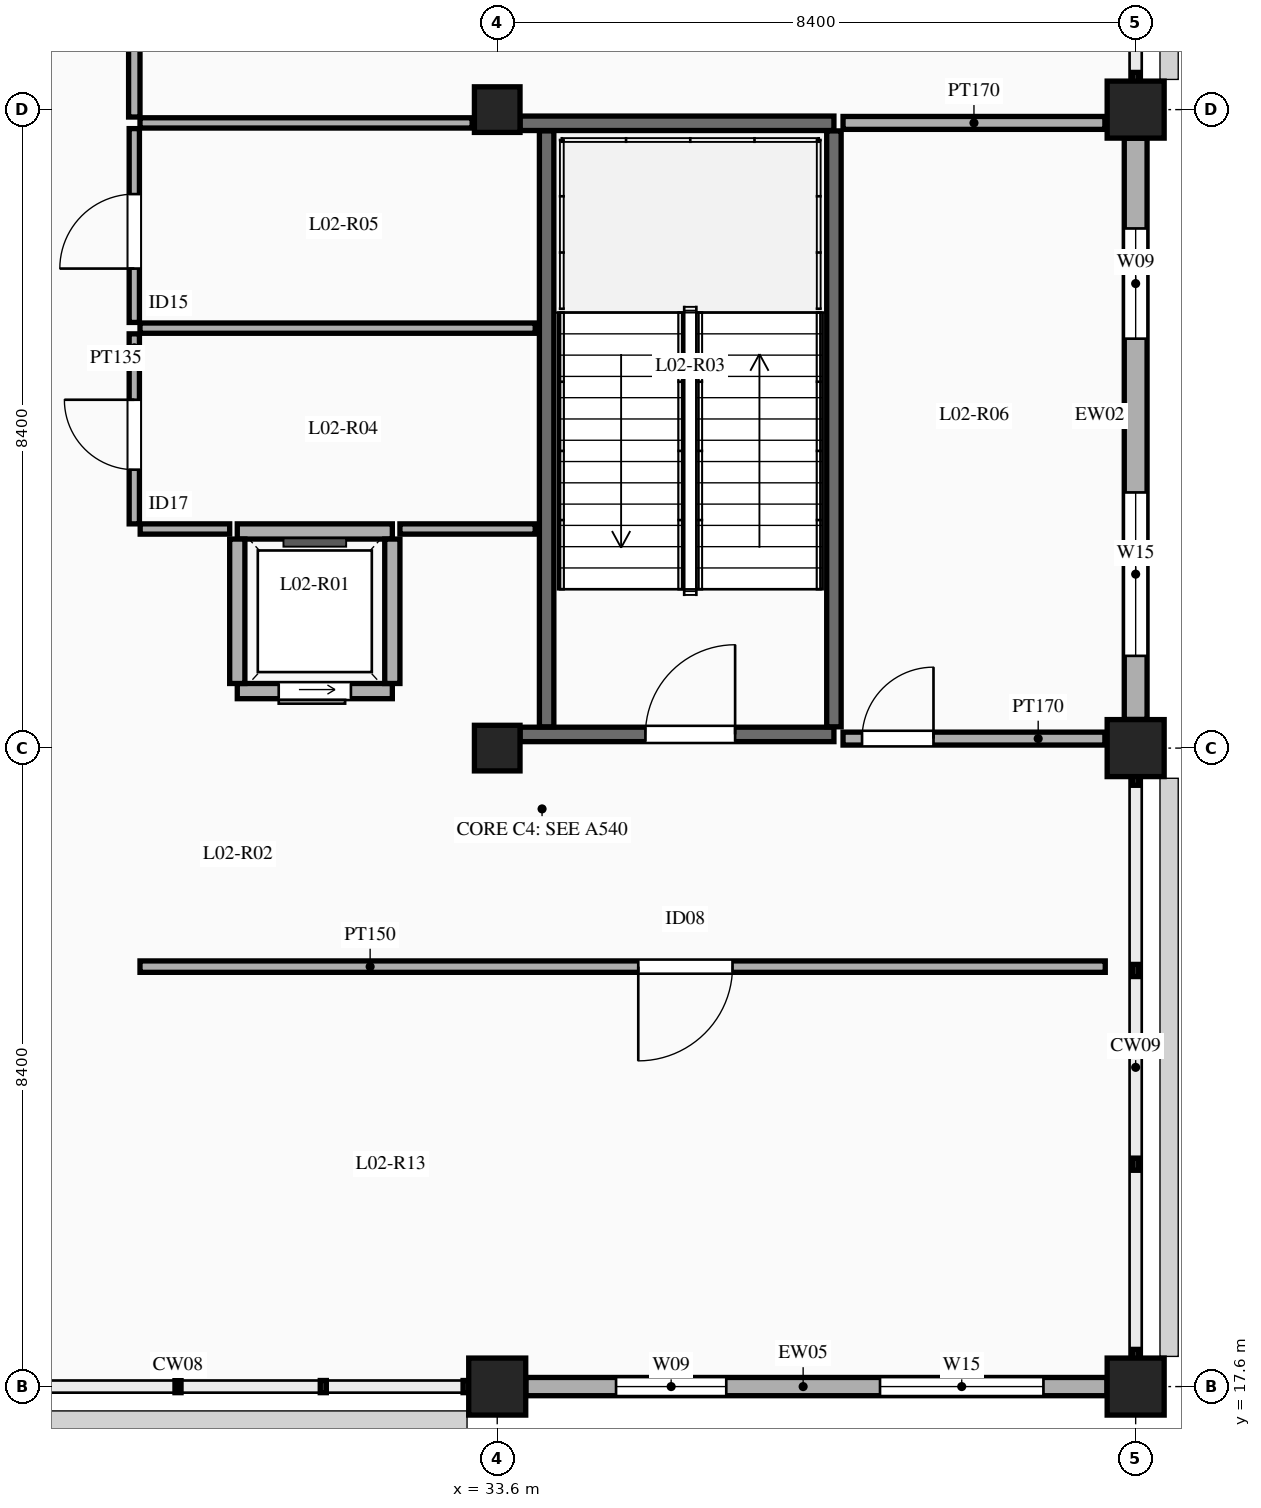
"""IFC4 building model, lengths in metres.
Left out: names, types, materials, properties, quantities, classifications, styles, units other than length and angle.
Written with IfcOpenShell. Run it as: python <this file> out.ifc"""

import sys

from ifc_helpers import new_model, si_unit, direction, frame, frame_2d, origin, origin_2d, place, context, subcontext, project, spatial, rectangle, circle, extrude, element, fill, save


model = new_model("IFC4")
c1 = context("Model", 3, precision=1e-05, world=origin(), true_north=direction((0.0, 1.0)))
c2 = subcontext(c1, "Body", "Model", "MODEL_VIEW")
j1 = project(units=[si_unit("LENGTHUNIT", "METRE"), si_unit("PLANEANGLEUNIT", "RADIAN")], contexts=[c1])
p1 = place(None, origin())
s1 = spatial("IfcSite", under=j1, at=p1, CompositionType="ELEMENT")
p2 = place(p1, origin())
s2 = spatial("IfcBuilding", under=s1, at=p2, CompositionType="ELEMENT")
p3 = place(p2, frame((0.0, 0.0, 10.2)))
s3 = spatial("IfcBuildingStorey", under=s2, at=p3, CompositionType="ELEMENT", Elevation=10.2)
p4 = place(p3, frame((33.6, 17.6, 0.0), z_axis=(0.0, 0.0, 1.0), x_axis=(1.0, 0.0, 0.0)))
e1 = element("IfcColumn", 1, at=p4, inside=s3, PredefinedType="COLUMN", context=c2, shape_type="SweptSolid", body=[
    extrude(circle(Radius=0.375, at=origin_2d()), origin(), (0.0, 0.0, 1.0), 4.8),
])
for number, where, z_axis, x_axis in (
    (2, (33.6, 26.0, 0.0), (0.0, 0.0, 1.0), (1.0, 0.0, 0.0)),
    (3, (33.6, 34.4, 0.0), (0.0, 0.0, 1.0), (1.0, 0.0, 0.0)),
):
    element("IfcColumn", number, at=place(p3, frame(where, z_axis=z_axis, x_axis=x_axis)), inside=s3, PredefinedType="COLUMN", context=c2, shape_type="SweptSolid", body=[
        extrude(rectangle(XDim=0.6, YDim=0.6, at=origin_2d()), origin(), (0.0, 0.0, 1.0), 4.8),
    ])
for number, where, z_axis, x_axis in (
    (4, (42.0, 17.6, 0.0), (0.0, 0.0, 1.0), (1.0, 0.0, 0.0)),
    (5, (42.0, 26.0, 0.0), (0.0, 0.0, 1.0), (1.0, 0.0, 0.0)),
    (6, (42.0, 34.4, 0.0), (0.0, 0.0, 1.0), (1.0, 0.0, 0.0)),
):
    element("IfcColumn", number, at=place(p3, frame(where, z_axis=z_axis, x_axis=x_axis)), inside=s3, PredefinedType="COLUMN", context=c2, shape_type="SweptSolid", body=[
        extrude(circle(Radius=0.375, at=origin_2d()), origin(), (0.0, 0.0, 1.0), 4.8),
    ])
p5 = place(p3, frame((33.977, 17.6, 0.0), z_axis=(0.0, 0.0, 1.0), x_axis=(1.0, 0.0, 0.0)))
e7 = element("IfcWall", 7, at=p5, inside=s3, PredefinedType="SOLIDWALL", context=c2, shape_type="SweptSolid", body=[
    extrude(rectangle(XDim=7.646, YDim=0.24, at=frame_2d((3.823, 0.0))), origin(), (0.0, 0.0, 1.0), 3.85),
])
p6 = place(p5, frame((1.187, 0.0, 0.9)))
e8 = element("IfcOpeningElement", 8, at=p6, cuts=e7, PredefinedType="OPENING", context=c2, shape_type="SweptSolid", body=[
    extrude(rectangle(XDim=1.45, YDim=1.8, at=frame_2d((0.725, 0.9))), frame((0.0, 0.13, 0.0), z_axis=(0.0, -1.0, 0.0), x_axis=(1.0, 0.0, 0.0)), (0.0, 0.0, 1.0), 0.26),
])
p7 = place(p5, frame((4.659, 0.0, 1.1)))
e9 = element("IfcOpeningElement", 9, at=p7, cuts=e7, PredefinedType="OPENING", context=c2, shape_type="SweptSolid", body=[
    extrude(rectangle(XDim=2.15, YDim=2.15, at=frame_2d((1.075, 1.075))), frame((0.0, 0.13, 0.0), z_axis=(0.0, -1.0, 0.0), x_axis=(1.0, 0.0, 0.0)), (0.0, 0.0, 1.0), 0.26),
])
p8 = place(p3, frame((42.0, 26.377, 0.0), z_axis=(0.0, 0.0, 1.0), x_axis=(0.0, 1.0, 0.0)))
e10 = element("IfcWall", 10, at=p8, inside=s3, PredefinedType="SOLIDWALL", context=c2, shape_type="SweptSolid", body=[
    extrude(rectangle(XDim=7.646, YDim=0.3, at=frame_2d((3.823, 0.0))), origin(), (0.0, 0.0, 1.0), 3.85),
])
p9 = place(p8, frame((0.836, 0.0, 1.1)))
e11 = element("IfcOpeningElement", 11, at=p9, cuts=e10, PredefinedType="OPENING", context=c2, shape_type="SweptSolid", body=[
    extrude(rectangle(XDim=2.15, YDim=2.15, at=frame_2d((1.075, 1.075))), frame((0.0, 0.16, 0.0), z_axis=(0.0, -1.0, 0.0), x_axis=(1.0, 0.0, 0.0)), (0.0, 0.0, 1.0), 0.32),
])
p10 = place(p8, frame((5.01, 0.0, 0.9)))
e12 = element("IfcOpeningElement", 12, at=p10, cuts=e10, PredefinedType="OPENING", context=c2, shape_type="SweptSolid", body=[
    extrude(rectangle(XDim=1.45, YDim=1.8, at=frame_2d((0.725, 0.9))), frame((0.0, 0.16, 0.0), z_axis=(0.0, -1.0, 0.0), x_axis=(1.0, 0.0, 0.0)), (0.0, 0.0, 1.0), 0.32),
])
p11 = place(p3, frame((30.18, 26.75, 0.0), z_axis=(0.0, 0.0, 1.0), x_axis=(1.0, 0.0, 0.0)))
e13 = element("IfcWall", 13, at=p11, inside=s3, PredefinedType="SOLIDWALL", context=c2, shape_type="SweptSolid", body=[
    extrude(rectangle(XDim=2.04, YDim=0.2, at=frame_2d((1.02, 0.0))), origin(), (0.0, 0.0, 1.0), 4.55),
])
p12 = place(p11, frame((0.545, 0.0, 0.0)))
e14 = element("IfcOpeningElement", 14, at=p12, cuts=e13, PredefinedType="OPENING", context=c2, shape_type="SweptSolid", body=[
    extrude(rectangle(XDim=0.95, YDim=2.15, at=frame_2d((0.475, 1.075))), frame((0.0, 0.11, 0.0), z_axis=(0.0, -1.0, 0.0), x_axis=(1.0, 0.0, 0.0)), (0.0, 0.0, 1.0), 0.22),
])
p13 = place(p3, frame((30.18, 28.85, 0.0), z_axis=(0.0, 0.0, 1.0), x_axis=(1.0, 0.0, 0.0)))
e15 = element("IfcWall", 15, at=p13, inside=s3, PredefinedType="SOLIDWALL", context=c2, shape_type="SweptSolid", body=[
    extrude(rectangle(XDim=2.04, YDim=0.2, at=frame_2d((1.02, 0.0))), origin(), (0.0, 0.0, 1.0), 4.55),
])
for number, where, z_axis, x_axis in (
    (16, (30.18, 26.85, 0.0), (0.0, 0.0, 1.0), (0.0, 1.0, 0.0)),
    (17, (32.22, 26.85, 0.0), (0.0, 0.0, 1.0), (0.0, 1.0, 0.0)),
):
    element("IfcWall", number, at=place(p3, frame(where, z_axis=z_axis, x_axis=x_axis)), inside=s3, PredefinedType="SOLIDWALL", context=c2, shape_type="SweptSolid", body=[
        extrude(rectangle(XDim=1.9, YDim=0.2, at=frame_2d((0.95, 0.0))), origin(), (0.0, 0.0, 1.0), 4.55),
    ])
p14 = place(p3, frame((33.9, 26.18, 0.0), z_axis=(0.0, 0.0, 1.0), x_axis=(1.0, 0.0, 0.0)))
e18 = element("IfcWall", 18, at=p14, inside=s3, PredefinedType="SOLIDWALL", context=c2, shape_type="SweptSolid", body=[
    extrude(rectangle(XDim=4.13, YDim=0.19, at=frame_2d((2.065, 0.0))), origin(), (0.0, 0.0, 1.0), 4.55),
])
p15 = place(p14, frame((1.65, 0.0, 0.0)))
e19 = element("IfcOpeningElement", 19, at=p15, cuts=e18, PredefinedType="OPENING", context=c2, shape_type="SweptSolid", body=[
    extrude(rectangle(XDim=1.18, YDim=2.15, at=frame_2d((0.59, 1.075))), frame((0.0, 0.105, 0.0), z_axis=(0.0, -1.0, 0.0), x_axis=(1.0, 0.0, 0.0)), (0.0, 0.0, 1.0), 0.21),
])
p16 = place(p3, frame((33.9, 34.22, 0.0), z_axis=(0.0, 0.0, 1.0), x_axis=(1.0, 0.0, 0.0)))
e20 = element("IfcWall", 20, at=p16, inside=s3, PredefinedType="SOLIDWALL", context=c2, shape_type="SweptSolid", body=[
    extrude(rectangle(XDim=4.13, YDim=0.19, at=frame_2d((2.065, 0.0))), origin(), (0.0, 0.0, 1.0), 4.55),
])
for number, where, z_axis, x_axis in (
    (21, (34.25, 26.28, 0.0), (0.0, 0.0, 1.0), (0.0, 1.0, 0.0)),
    (22, (38.03, 26.28, 0.0), (0.0, 0.0, 1.0), (0.0, 1.0, 0.0)),
):
    element("IfcWall", number, at=place(p3, frame(where, z_axis=z_axis, x_axis=x_axis)), inside=s3, PredefinedType="SOLIDWALL", context=c2, shape_type="SweptSolid", body=[
        extrude(rectangle(XDim=7.84, YDim=0.19, at=frame_2d((3.92, 0.0))), origin(), (0.0, 0.0, 1.0), 4.55),
    ])
p17 = place(p3, frame((38.15, 26.125, 0.0), z_axis=(0.0, 0.0, 1.0), x_axis=(1.0, 0.0, 0.0)))
e23 = element("IfcWall", 23, at=p17, inside=s3, PredefinedType="PARTITIONING", context=c2, shape_type="SweptSolid", body=[
    extrude(rectangle(XDim=3.445, YDim=0.17, at=frame_2d((1.723, 0.0))), origin(), (0.0, 0.0, 1.0), 3.75),
])
p18 = place(p17, frame((0.25, 0.0, 0.0)))
e24 = element("IfcOpeningElement", 24, at=p18, cuts=e23, PredefinedType="OPENING", context=c2, shape_type="SweptSolid", body=[
    extrude(rectangle(XDim=0.94, YDim=2.1, at=frame_2d((0.47, 1.05))), frame((0.0, 0.095, 0.0), z_axis=(0.0, -1.0, 0.0), x_axis=(1.0, 0.0, 0.0)), (0.0, 0.0, 1.0), 0.19),
])
p19 = place(p3, frame((28.9, 23.125, 0.0), z_axis=(0.0, 0.0, 1.0), x_axis=(1.0, 0.0, 0.0)))
e25 = element("IfcWall", 25, at=p19, inside=s3, PredefinedType="PARTITIONING", context=c2, shape_type="SweptSolid", body=[
    extrude(rectangle(XDim=12.7, YDim=0.15, at=frame_2d((6.35, 0.0))), origin(), (0.0, 0.0, 1.0), 3.75),
])
p20 = place(p19, frame((6.556, 0.0, 0.0)))
e26 = element("IfcOpeningElement", 26, at=p20, cuts=e25, PredefinedType="OPENING", context=c2, shape_type="SweptSolid", body=[
    extrude(rectangle(XDim=1.24, YDim=2.2, at=frame_2d((0.62, 1.1))), frame((0.0, 0.085, 0.0), z_axis=(0.0, -1.0, 0.0), x_axis=(1.0, 0.0, 0.0)), (0.0, 0.0, 1.0), 0.17),
])
p21 = place(p3, frame((28.9, 31.525, 0.0), z_axis=(0.0, 0.0, 1.0), x_axis=(1.0, 0.0, 0.0)))
e27 = element("IfcWall", 27, at=p21, inside=s3, PredefinedType="PARTITIONING", context=c2, shape_type="SweptSolid", body=[
    extrude(rectangle(XDim=5.2, YDim=0.135, at=frame_2d((2.6, 0.0))), origin(), (0.0, 0.0, 1.0), 3.75),
])
p22 = place(p3, frame((28.825, 28.95, 0.0), z_axis=(0.0, 0.0, 1.0), x_axis=(0.0, 1.0, 0.0)))
e28 = element("IfcWall", 28, at=p22, inside=s3, PredefinedType="PARTITIONING", context=c2, shape_type="SweptSolid", body=[
    extrude(rectangle(XDim=2.5, YDim=0.135, at=frame_2d((1.25, 0.0))), origin(), (0.0, 0.0, 1.0), 3.75),
])
p23 = place(p22, frame((0.713, 0.0, 0.0)))
e29 = element("IfcOpeningElement", 29, at=p23, cuts=e28, PredefinedType="OPENING", context=c2, shape_type="SweptSolid", body=[
    extrude(rectangle(XDim=0.92, YDim=2.12, at=frame_2d((0.46, 1.06))), frame((0.0, 0.077, 0.0), z_axis=(0.0, -1.0, 0.0), x_axis=(1.0, 0.0, 0.0)), (0.0, 0.0, 1.0), 0.155),
])
p24 = place(p3, frame((28.825, 31.6, 0.0), z_axis=(0.0, 0.0, 1.0), x_axis=(0.0, 1.0, 0.0)))
e30 = element("IfcWall", 30, at=p24, inside=s3, PredefinedType="PARTITIONING", context=c2, shape_type="SweptSolid", body=[
    extrude(rectangle(XDim=2.55, YDim=0.135, at=frame_2d((1.275, 0.0))), origin(), (0.0, 0.0, 1.0), 3.75),
])
p25 = place(p24, frame((0.708, 0.0, 0.0)))
e31 = element("IfcOpeningElement", 31, at=p25, cuts=e30, PredefinedType="OPENING", context=c2, shape_type="SweptSolid", body=[
    extrude(rectangle(XDim=0.98, YDim=2.15, at=frame_2d((0.49, 1.075))), frame((0.0, 0.077, 0.0), z_axis=(0.0, -1.0, 0.0), x_axis=(1.0, 0.0, 0.0)), (0.0, 0.0, 1.0), 0.155),
])
p26 = place(p3, frame((28.9, 34.225, 0.0), z_axis=(0.0, 0.0, 1.0), x_axis=(1.0, 0.0, 0.0)))
e32 = element("IfcWall", 32, at=p26, inside=s3, PredefinedType="PARTITIONING", context=c2, shape_type="SweptSolid", body=[
    extrude(rectangle(XDim=4.37, YDim=0.135, at=frame_2d((2.185, 0.0))), origin(), (0.0, 0.0, 1.0), 3.75),
])
p27 = place(p3, frame((38.15, 34.225, 0.0), z_axis=(0.0, 0.0, 1.0), x_axis=(1.0, 0.0, 0.0)))
e33 = element("IfcWall", 33, at=p27, inside=s3, PredefinedType="PARTITIONING", context=c2, shape_type="SweptSolid", body=[
    extrude(rectangle(XDim=3.445, YDim=0.17, at=frame_2d((1.723, 0.0))), origin(), (0.0, 0.0, 1.0), 3.75),
])
p28 = place(p3, frame((28.825, 34.302, 0.0), z_axis=(0.0, 0.0, 1.0), x_axis=(0.0, 1.0, 0.0)))
e34 = element("IfcWall", 34, at=p28, inside=s3, PredefinedType="PARTITIONING", context=c2, shape_type="SweptSolid", body=[
    extrude(rectangle(XDim=14.698, YDim=0.15, at=frame_2d((7.349, 0.0))), origin(), (0.0, 0.0, 1.0), 3.75),
])
p29 = place(p28, frame((6.729, 0.0, 0.0)))
e35 = element("IfcOpeningElement", 35, at=p29, cuts=e34, PredefinedType="OPENING", context=c2, shape_type="SweptSolid", body=[
    extrude(rectangle(XDim=1.24, YDim=2.2, at=frame_2d((0.62, 1.1))), frame((0.0, 0.085, 0.0), z_axis=(0.0, -1.0, 0.0), x_axis=(1.0, 0.0, 0.0)), (0.0, 0.0, 1.0), 0.17),
])
p30 = place(p3, frame((28.903, 28.883, 0.0), z_axis=(0.0, 0.0, 1.0), x_axis=(1.0, 0.0, 0.0)))
e36 = element("IfcWall", 36, at=p30, inside=s3, PredefinedType="PARTITIONING", context=c2, shape_type="SweptSolid", body=[
    extrude(rectangle(XDim=1.177, YDim=0.135, at=frame_2d((0.589, 0.0))), origin(), (0.0, 0.0, 1.0), 3.75),
])
p31 = place(p3, frame((32.32, 28.883, 0.0), z_axis=(0.0, 0.0, 1.0), x_axis=(1.0, 0.0, 0.0)))
e37 = element("IfcWall", 37, at=p31, inside=s3, PredefinedType="PARTITIONING", context=c2, shape_type="SweptSolid", body=[
    extrude(rectangle(XDim=1.78, YDim=0.135, at=frame_2d((0.89, 0.0))), origin(), (0.0, 0.0, 1.0), 3.75),
])
p32 = place(p6, origin())
e38 = element("IfcWindow", 38, at=p32, inside=s3, PartitioningType="DOUBLE_PANEL_HORIZONTAL", PredefinedType="WINDOW", context=c2, shape_type="SweptSolid", body=[
    extrude(rectangle(XDim=1.45, YDim=1.8, at=frame_2d((0.725, 0.9))), frame((0.0, 0.03, 0.0), z_axis=(0.0, -1.0, 0.0), x_axis=(1.0, 0.0, 0.0)), (0.0, 0.0, 1.0), 0.06),
])
fill(e8, e38)
p33 = place(p7, origin())
e39 = element("IfcWindow", 39, at=p33, inside=s3, PartitioningType="TRIPLE_PANEL_VERTICAL", PredefinedType="WINDOW", context=c2, shape_type="SweptSolid", body=[
    extrude(rectangle(XDim=2.15, YDim=2.15, at=frame_2d((1.075, 1.075))), frame((0.0, 0.03, 0.0), z_axis=(0.0, -1.0, 0.0), x_axis=(1.0, 0.0, 0.0)), (0.0, 0.0, 1.0), 0.06),
])
fill(e9, e39)
p34 = place(p9, origin())
e40 = element("IfcWindow", 40, at=p34, inside=s3, PartitioningType="TRIPLE_PANEL_VERTICAL", PredefinedType="WINDOW", context=c2, shape_type="SweptSolid", body=[
    extrude(rectangle(XDim=2.15, YDim=2.15, at=frame_2d((1.075, 1.075))), frame((0.0, 0.03, 0.0), z_axis=(0.0, -1.0, 0.0), x_axis=(1.0, 0.0, 0.0)), (0.0, 0.0, 1.0), 0.06),
])
fill(e11, e40)
p35 = place(p10, origin())
e41 = element("IfcWindow", 41, at=p35, inside=s3, PartitioningType="DOUBLE_PANEL_HORIZONTAL", PredefinedType="WINDOW", context=c2, shape_type="SweptSolid", body=[
    extrude(rectangle(XDim=1.45, YDim=1.8, at=frame_2d((0.725, 0.9))), frame((0.0, 0.03, 0.0), z_axis=(0.0, -1.0, 0.0), x_axis=(1.0, 0.0, 0.0)), (0.0, 0.0, 1.0), 0.06),
])
fill(e12, e41)
p36 = place(p12, frame((0.95, 0.0, 0.0), z_axis=(0.0, 0.0, 1.0), x_axis=(-1.0, 0.0, 0.0)))
e42 = element("IfcDoor", 42, at=p36, inside=s3, OperationType="SLIDING_TO_LEFT", PredefinedType="DOOR", context=c2, shape_type="SweptSolid", body=[
    extrude(rectangle(XDim=0.95, YDim=2.15, at=frame_2d((0.475, 1.075))), frame((0.0, 0.025, 0.0), z_axis=(0.0, -1.0, 0.0), x_axis=(1.0, 0.0, 0.0)), (0.0, 0.0, 1.0), 0.05),
])
fill(e14, e42)
p37 = place(p15, origin())
e43 = element("IfcDoor", 43, at=p37, inside=s3, OperationType="SINGLE_SWING_RIGHT", PredefinedType="DOOR", context=c2, shape_type="SweptSolid", body=[
    extrude(rectangle(XDim=1.18, YDim=2.15, at=frame_2d((0.59, 1.075))), frame((0.0, 0.025, 0.0), z_axis=(0.0, -1.0, 0.0), x_axis=(1.0, 0.0, 0.0)), (0.0, 0.0, 1.0), 0.05),
])
fill(e19, e43)
p38 = place(p23, origin())
e44 = element("IfcDoor", 44, at=p38, inside=s3, OperationType="SINGLE_SWING_RIGHT", PredefinedType="DOOR", context=c2, shape_type="SweptSolid", body=[
    extrude(rectangle(XDim=0.92, YDim=2.12, at=frame_2d((0.46, 1.06))), frame((0.0, 0.025, 0.0), z_axis=(0.0, -1.0, 0.0), x_axis=(1.0, 0.0, 0.0)), (0.0, 0.0, 1.0), 0.05),
])
fill(e29, e44)
p39 = place(p25, origin())
e45 = element("IfcDoor", 45, at=p39, inside=s3, OperationType="SINGLE_SWING_LEFT", PredefinedType="DOOR", context=c2, shape_type="SweptSolid", body=[
    extrude(rectangle(XDim=0.98, YDim=2.15, at=frame_2d((0.49, 1.075))), frame((0.0, 0.025, 0.0), z_axis=(0.0, -1.0, 0.0), x_axis=(1.0, 0.0, 0.0)), (0.0, 0.0, 1.0), 0.05),
])
fill(e31, e45)
p40 = place(p18, origin())
e46 = element("IfcDoor", 46, at=p40, inside=s3, OperationType="SINGLE_SWING_RIGHT", PredefinedType="DOOR", context=c2, shape_type="SweptSolid", body=[
    extrude(rectangle(XDim=0.94, YDim=2.1, at=frame_2d((0.47, 1.05))), frame((0.0, 0.025, 0.0), z_axis=(0.0, -1.0, 0.0), x_axis=(1.0, 0.0, 0.0)), (0.0, 0.0, 1.0), 0.05),
])
fill(e24, e46)
p41 = place(p20, frame((1.24, 0.0, 0.0), z_axis=(0.0, 0.0, 1.0), x_axis=(-1.0, 0.0, 0.0)))
e47 = element("IfcDoor", 47, at=p41, inside=s3, OperationType="SINGLE_SWING_RIGHT", PredefinedType="DOOR", context=c2, shape_type="SweptSolid", body=[
    extrude(rectangle(XDim=1.24, YDim=2.2, at=frame_2d((0.62, 1.1))), frame((0.0, 0.025, 0.0), z_axis=(0.0, -1.0, 0.0), x_axis=(1.0, 0.0, 0.0)), (0.0, 0.0, 1.0), 0.05),
])
fill(e26, e47)
save(model, sys.argv[1])
